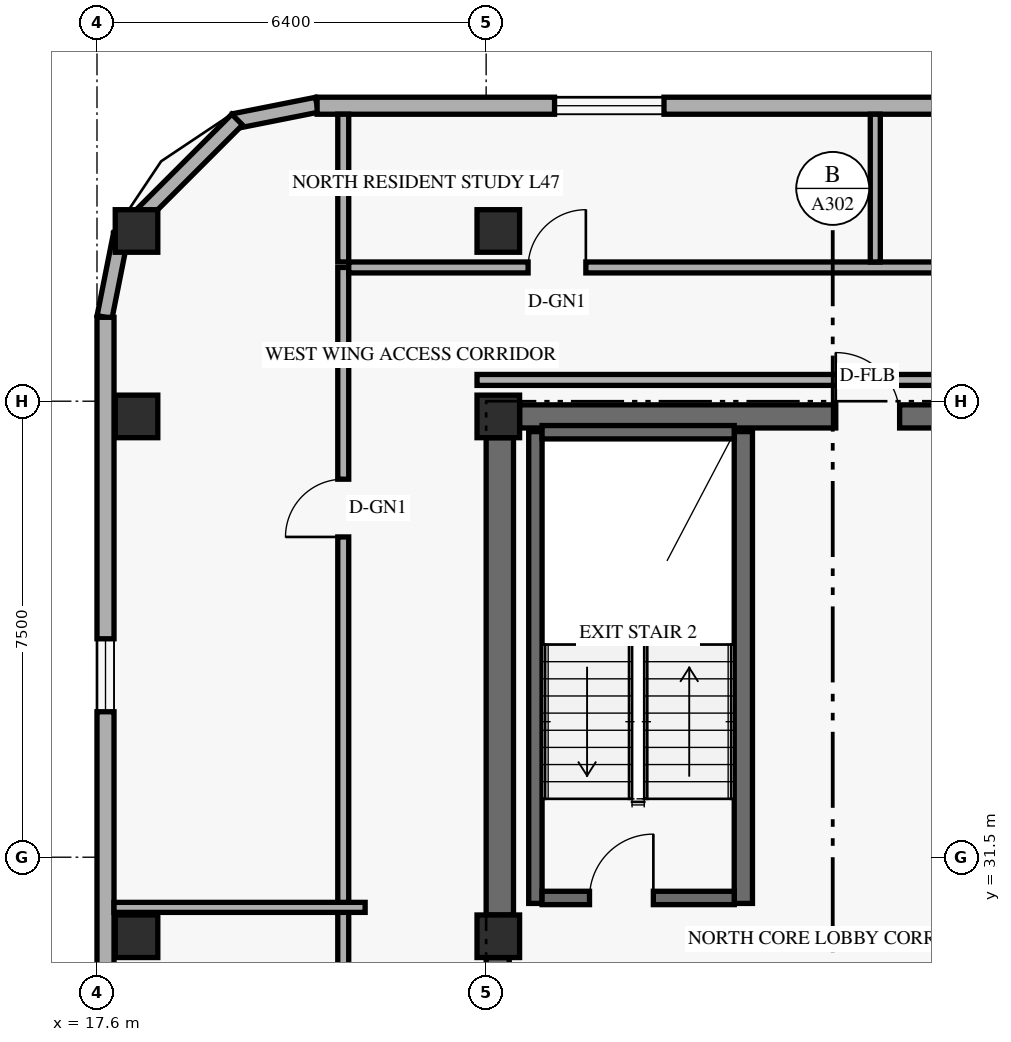
"""IFC4 building model, lengths in metres.
Left out: names, types, materials, properties, quantities, classifications, styles, units other than length and angle.
Written with IfcOpenShell. Run it as: python <this file> out.ifc"""

import sys

from ifc_helpers import new_model, si_unit, direction, frame, frame_2d, origin, origin_2d, place, context, subcontext, project, spatial, rectangle, extrude, element, fill, save


model = new_model("IFC4")
c1 = context("Model", 3, precision=1e-05, world=origin(), true_north=direction((0.0, 1.0)))
c2 = subcontext(c1, "Body", "Model", "MODEL_VIEW")
j1 = project(units=[si_unit("LENGTHUNIT", "METRE"), si_unit("PLANEANGLEUNIT", "RADIAN")], contexts=[c1])
p1 = place(None, origin())
s1 = spatial("IfcSite", under=j1, at=p1, CompositionType="ELEMENT")
p2 = place(p1, origin())
s2 = spatial("IfcBuilding", under=s1, at=p2, CompositionType="ELEMENT")
p3 = place(p2, frame((0.0, 0.0, 181.2)))
s3 = spatial("IfcBuildingStorey", under=s2, at=p3, CompositionType="ELEMENT", Elevation=181.2)
p4 = place(p3, frame((24.19, 17.9, 0.0), z_axis=(0.0, 0.0, 1.0), x_axis=(0.0, 1.0, 0.0)))
e1 = element("IfcWall", 1, at=p4, inside=s3, PredefinedType="SHEAR", context=c2, shape_type="SweptSolid", body=[
    extrude(rectangle(XDim=11.95, YDim=0.38, at=frame_2d((5.975, 0.0))), origin(), (0.0, 0.0, 1.0), 2.748),
])
p5 = place(p3, frame((24.225, 30.55, 0.0), z_axis=(0.0, 0.0, 1.0), x_axis=(0.0, 1.0, 0.0)))
e2 = element("IfcWall", 2, at=p5, inside=s3, PredefinedType="SHEAR", context=c2, shape_type="SweptSolid", body=[
    extrude(rectangle(XDim=7.85, YDim=0.45, at=frame_2d((3.925, 0.0))), origin(), (0.0, 0.0, 1.0), 2.748),
])
p6 = place(p3, frame((24.55, 38.75, 0.0), z_axis=(0.0, 0.0, 1.0), x_axis=(1.0, 0.0, 0.0)))
e3 = element("IfcWall", 3, at=p6, inside=s3, PredefinedType="SHEAR", context=c2, shape_type="SweptSolid", body=[
    extrude(rectangle(XDim=10.3, YDim=0.38, at=frame_2d((5.15, 0.0))), origin(), (0.0, 0.0, 1.0), 3.36),
])
p7 = place(p6, frame((5.2, 0.0, 0.0)))
e4 = element("IfcOpeningElement", 4, at=p7, cuts=e3, PredefinedType="OPENING", context=c2, shape_type="SweptSolid", body=[
    extrude(rectangle(XDim=1.05, YDim=2.15, at=frame_2d((0.525, 1.075))), frame((0.0, 0.2, 0.0), z_axis=(0.0, -1.0, 0.0), x_axis=(1.0, 0.0, 0.0)), (0.0, 0.0, 1.0), 0.4),
])
p8 = place(p3, frame((24.81, 30.74, 0.0), z_axis=(0.0, 0.0, 1.0), x_axis=(0.0, 1.0, 0.0)))
e5 = element("IfcWall", 5, at=p8, inside=s3, PredefinedType="SHEAR", context=c2, shape_type="SweptSolid", body=[
    extrude(rectangle(XDim=7.76, YDim=0.22, at=frame_2d((3.88, 0.0))), origin(), (0.0, 0.0, 1.0), 3.36),
])
p9 = place(p3, frame((28.23, 30.74, 0.0), z_axis=(0.0, 0.0, 1.0), x_axis=(0.0, 1.0, 0.0)))
e6 = element("IfcWall", 6, at=p9, inside=s3, PredefinedType="SHEAR", context=c2, shape_type="SweptSolid", body=[
    extrude(rectangle(XDim=7.76, YDim=0.3, at=frame_2d((3.88, 0.0))), origin(), (0.0, 0.0, 1.0), 3.36),
])
p10 = place(p3, frame((24.92, 30.83, 0.0), z_axis=(0.0, 0.0, 1.0), x_axis=(1.0, 0.0, 0.0)))
e7 = element("IfcWall", 7, at=p10, inside=s3, PredefinedType="SHEAR", context=c2, shape_type="SweptSolid", body=[
    extrude(rectangle(XDim=3.16, YDim=0.22, at=frame_2d((1.58, 0.0))), origin(), (0.0, 0.0, 1.0), 3.36),
])
p11 = place(p10, frame((0.78, 0.0, 0.0)))
e8 = element("IfcOpeningElement", 8, at=p11, cuts=e7, PredefinedType="OPENING", context=c2, shape_type="SweptSolid", body=[
    extrude(rectangle(XDim=1.05, YDim=2.15, at=frame_2d((0.525, 1.075))), frame((0.0, 0.12, 0.0), z_axis=(0.0, -1.0, 0.0), x_axis=(1.0, 0.0, 0.0)), (0.0, 0.0, 1.0), 0.24),
])
p12 = place(p3, frame((24.92, 38.49, 0.0), z_axis=(0.0, 0.0, 1.0), x_axis=(1.0, 0.0, 0.0)))
e9 = element("IfcWall", 9, at=p12, inside=s3, PredefinedType="SHEAR", context=c2, shape_type="SweptSolid", body=[
    extrude(rectangle(XDim=3.16, YDim=0.22, at=frame_2d((1.58, 0.0))), origin(), (0.0, 0.0, 1.0), 3.36),
])
for number, where, z_axis, x_axis in (
    (10, (18.25, 30.2, 0.0), (0.0, 0.0, 1.0), (1.0, 0.0, 0.0)),
    (11, (18.25, 38.75, 0.0), (0.0, 0.0, 1.0), (1.0, 0.0, 0.0)),
    (12, (18.25, 41.8, 0.0), (0.0, 0.0, 1.0), (1.0, 0.0, 0.0)),
    (13, (24.2, 30.2, 0.0), (0.0, 0.0, 1.0), (1.0, 0.0, 0.0)),
    (14, (24.2, 38.75, 0.0), (0.0, 0.0, 1.0), (1.0, 0.0, 0.0)),
    (15, (24.2, 41.8, 0.0), (0.0, 0.0, 1.0), (1.0, 0.0, 0.0)),
):
    element("IfcColumn", number, at=place(p3, frame(where, z_axis=z_axis, x_axis=x_axis)), inside=s3, PredefinedType="COLUMN", context=c2, shape_type="SweptSolid", body=[
        extrude(rectangle(XDim=0.7, YDim=0.7, at=origin_2d()), origin(), (0.0, 0.0, 1.0), 3.6),
    ])
p13 = place(p3, frame((21.217, 43.876, 0.0), z_axis=(0.0, 0.0, 1.0), x_axis=(-0.980809899341, -0.19496651342, 0.0)))
e16 = element("IfcWall", 16, at=p13, inside=s3, PredefinedType="SOLIDWALL", context=c2, shape_type="SweptSolid", body=[
    extrude(rectangle(XDim=1.389, YDim=0.25, at=frame_2d((0.694, 0.0))), origin(), (0.0, 0.0, 1.0), 3.36),
])
p14 = place(p3, frame((19.905, 43.632, 0.0), z_axis=(0.0, 0.0, 1.0), x_axis=(-0.707106781187, -0.707106781187, 0.0)))
e17 = element("IfcWall", 17, at=p14, inside=s3, PredefinedType="SOLIDWALL", context=c2, shape_type="SweptSolid", body=[
    extrude(rectangle(XDim=2.739, YDim=0.25, at=frame_2d((1.37, 0.0))), origin(), (0.0, 0.0, 1.0), 3.36),
])
p15 = place(p3, frame((17.995, 41.746, 0.0), z_axis=(0.0, 0.0, 1.0), x_axis=(-0.195135625965, -0.9807762678, 0.0)))
e18 = element("IfcWall", 18, at=p15, inside=s3, PredefinedType="SOLIDWALL", context=c2, shape_type="SweptSolid", body=[
    extrude(rectangle(XDim=1.389, YDim=0.25, at=frame_2d((0.694, 0.0))), origin(), (0.0, 0.0, 1.0), 3.36),
])
p16 = place(p3, frame((54.98, 43.86, 0.0), z_axis=(0.0, 0.0, 1.0), x_axis=(-1.0, 0.0, 0.0)))
e19 = element("IfcWall", 19, at=p16, inside=s3, PredefinedType="SOLIDWALL", context=c2, shape_type="SweptSolid", body=[
    extrude(rectangle(XDim=33.76, YDim=0.28, at=frame_2d((16.88, 0.0))), origin(), (0.0, 0.0, 1.0), 3.36),
])
p17 = place(p16, frame((28.055, 0.0, 0.85)))
e20 = element("IfcOpeningElement", 20, at=p17, cuts=e19, PredefinedType="OPENING", context=c2, shape_type="SweptSolid", body=[
    extrude(rectangle(XDim=1.8, YDim=1.6, at=frame_2d((0.9, 0.8))), frame((0.0, 0.15, 0.0), z_axis=(0.0, -1.0, 0.0), x_axis=(1.0, 0.0, 0.0)), (0.0, 0.0, 1.0), 0.3),
])
p18 = place(p16, frame((21.17, 0.0, 0.85)))
e21 = element("IfcOpeningElement", 21, at=p18, cuts=e19, PredefinedType="OPENING", context=c2, shape_type="SweptSolid", body=[
    extrude(rectangle(XDim=1.8, YDim=1.6, at=frame_2d((0.9, 0.8))), frame((0.0, 0.15, 0.0), z_axis=(0.0, -1.0, 0.0), x_axis=(1.0, 0.0, 0.0)), (0.0, 0.0, 1.0), 0.3),
])
p19 = place(p16, frame((17.44, 0.0, 0.85)))
e22 = element("IfcOpeningElement", 22, at=p19, cuts=e19, PredefinedType="OPENING", context=c2, shape_type="SweptSolid", body=[
    extrude(rectangle(XDim=1.8, YDim=1.6, at=frame_2d((0.9, 0.8))), frame((0.0, 0.15, 0.0), z_axis=(0.0, -1.0, 0.0), x_axis=(1.0, 0.0, 0.0)), (0.0, 0.0, 1.0), 0.3),
])
p20 = place(p16, frame((13.32, 0.0, 0.85)))
e23 = element("IfcOpeningElement", 23, at=p20, cuts=e19, PredefinedType="OPENING", context=c2, shape_type="SweptSolid", body=[
    extrude(rectangle(XDim=1.8, YDim=1.6, at=frame_2d((0.9, 0.8))), frame((0.0, 0.15, 0.0), z_axis=(0.0, -1.0, 0.0), x_axis=(1.0, 0.0, 0.0)), (0.0, 0.0, 1.0), 0.3),
])
p21 = place(p16, frame((8.35, 0.0, 0.85)))
e24 = element("IfcOpeningElement", 24, at=p21, cuts=e19, PredefinedType="OPENING", context=c2, shape_type="SweptSolid", body=[
    extrude(rectangle(XDim=1.8, YDim=1.6, at=frame_2d((0.9, 0.8))), frame((0.0, 0.15, 0.0), z_axis=(0.0, -1.0, 0.0), x_axis=(1.0, 0.0, 0.0)), (0.0, 0.0, 1.0), 0.3),
])
p22 = place(p16, frame((5.68, 0.0, 0.85)))
e25 = element("IfcOpeningElement", 25, at=p22, cuts=e19, PredefinedType="OPENING", context=c2, shape_type="SweptSolid", body=[
    extrude(rectangle(XDim=1.2, YDim=1.5, at=frame_2d((0.6, 0.75))), frame((0.0, 0.15, 0.0), z_axis=(0.0, -1.0, 0.0), x_axis=(1.0, 0.0, 0.0)), (0.0, 0.0, 1.0), 0.3),
])
p23 = place(p16, frame((1.79, 0.0, 0.85)))
e26 = element("IfcOpeningElement", 26, at=p23, cuts=e19, PredefinedType="OPENING", context=c2, shape_type="SweptSolid", body=[
    extrude(rectangle(XDim=1.8, YDim=1.6, at=frame_2d((0.9, 0.8))), frame((0.0, 0.15, 0.0), z_axis=(0.0, -1.0, 0.0), x_axis=(1.0, 0.0, 0.0)), (0.0, 0.0, 1.0), 0.3),
])
p24 = place(p3, frame((17.74, 40.38, 0.0), z_axis=(0.0, 0.0, 1.0), x_axis=(0.0, -1.0, 0.0)))
e27 = element("IfcWall", 27, at=p24, inside=s3, PredefinedType="SOLIDWALL", context=c2, shape_type="SweptSolid", body=[
    extrude(rectangle(XDim=32.76, YDim=0.28, at=frame_2d((16.38, 0.0))), origin(), (0.0, 0.0, 1.0), 3.36),
])
p25 = place(p24, frame((29.073, 0.0, 0.85)))
e28 = element("IfcOpeningElement", 28, at=p25, cuts=e27, PredefinedType="OPENING", context=c2, shape_type="SweptSolid", body=[
    extrude(rectangle(XDim=1.2, YDim=1.5, at=frame_2d((0.6, 0.75))), frame((0.0, 0.15, 0.0), z_axis=(0.0, -1.0, 0.0), x_axis=(1.0, 0.0, 0.0)), (0.0, 0.0, 1.0), 0.3),
])
p26 = place(p24, frame((25.363, 0.0, 0.85)))
e29 = element("IfcOpeningElement", 29, at=p26, cuts=e27, PredefinedType="OPENING", context=c2, shape_type="SweptSolid", body=[
    extrude(rectangle(XDim=1.2, YDim=1.5, at=frame_2d((0.6, 0.75))), frame((0.0, 0.15, 0.0), z_axis=(0.0, -1.0, 0.0), x_axis=(1.0, 0.0, 0.0)), (0.0, 0.0, 1.0), 0.3),
])
p27 = place(p24, frame((15.7, 0.0, 0.85)))
e30 = element("IfcOpeningElement", 30, at=p27, cuts=e27, PredefinedType="OPENING", context=c2, shape_type="SweptSolid", body=[
    extrude(rectangle(XDim=1.2, YDim=1.5, at=frame_2d((0.6, 0.75))), frame((0.0, 0.15, 0.0), z_axis=(0.0, -1.0, 0.0), x_axis=(1.0, 0.0, 0.0)), (0.0, 0.0, 1.0), 0.3),
])
p28 = place(p24, frame((5.288, 0.0, 0.85)))
e31 = element("IfcOpeningElement", 31, at=p28, cuts=e27, PredefinedType="OPENING", context=c2, shape_type="SweptSolid", body=[
    extrude(rectangle(XDim=1.2, YDim=1.5, at=frame_2d((0.6, 0.75))), frame((0.0, 0.15, 0.0), z_axis=(0.0, -1.0, 0.0), x_axis=(1.0, 0.0, 0.0)), (0.0, 0.0, 1.0), 0.3),
])
p29 = place(p3, frame((21.65, 6.8, 0.0), z_axis=(0.0, 0.0, 1.0), x_axis=(0.0, 1.0, 0.0)))
e32 = element("IfcWall", 32, at=p29, inside=s3, PredefinedType="STANDARD", context=c2, shape_type="SweptSolid", body=[
    extrude(rectangle(XDim=34.4, YDim=0.18, at=frame_2d((17.2, 0.0))), origin(), (0.0, 0.0, 1.0), 2.73),
])
p30 = place(p29, frame((0.732, 0.0, 0.0)))
e33 = element("IfcOpeningElement", 33, at=p30, cuts=e32, PredefinedType="OPENING", context=c2, shape_type="SweptSolid", body=[
    extrude(rectangle(XDim=0.95, YDim=2.15, at=frame_2d((0.475, 1.075))), frame((0.0, 0.1, 0.0), z_axis=(0.0, -1.0, 0.0), x_axis=(1.0, 0.0, 0.0)), (0.0, 0.0, 1.0), 0.2),
])
p31 = place(p29, frame((7.768, 0.0, 0.0)))
e34 = element("IfcOpeningElement", 34, at=p31, cuts=e32, PredefinedType="OPENING", context=c2, shape_type="SweptSolid", body=[
    extrude(rectangle(XDim=0.95, YDim=2.15, at=frame_2d((0.475, 1.075))), frame((0.0, 0.1, 0.0), z_axis=(0.0, -1.0, 0.0), x_axis=(1.0, 0.0, 0.0)), (0.0, 0.0, 1.0), 0.2),
])
p32 = place(p29, frame((17.333, 0.0, 0.0)))
e35 = element("IfcOpeningElement", 35, at=p32, cuts=e32, PredefinedType="OPENING", context=c2, shape_type="SweptSolid", body=[
    extrude(rectangle(XDim=0.95, YDim=2.15, at=frame_2d((0.475, 1.075))), frame((0.0, 0.1, 0.0), z_axis=(0.0, -1.0, 0.0), x_axis=(1.0, 0.0, 0.0)), (0.0, 0.0, 1.0), 0.2),
])
p33 = place(p29, frame((29.968, 0.0, 0.0)))
e36 = element("IfcOpeningElement", 36, at=p33, cuts=e32, PredefinedType="OPENING", context=c2, shape_type="SweptSolid", body=[
    extrude(rectangle(XDim=0.95, YDim=2.15, at=frame_2d((0.475, 1.075))), frame((0.0, 0.1, 0.0), z_axis=(0.0, -1.0, 0.0), x_axis=(1.0, 0.0, 0.0)), (0.0, 0.0, 1.0), 0.2),
])
p34 = place(p3, frame((21.74, 41.2, 0.0), z_axis=(0.0, 0.0, 1.0), x_axis=(1.0, 0.0, 0.0)))
e37 = element("IfcWall", 37, at=p34, inside=s3, PredefinedType="STANDARD", context=c2, shape_type="SweptSolid", body=[
    extrude(rectangle(XDim=13.68, YDim=0.18, at=frame_2d((6.84, 0.0))), origin(), (0.0, 0.0, 1.0), 2.73),
])
p35 = place(p34, frame((2.95, 0.0, 0.0)))
e38 = element("IfcOpeningElement", 38, at=p35, cuts=e37, PredefinedType="OPENING", context=c2, shape_type="SweptSolid", body=[
    extrude(rectangle(XDim=0.95, YDim=2.15, at=frame_2d((0.475, 1.075))), frame((0.0, 0.1, 0.0), z_axis=(0.0, -1.0, 0.0), x_axis=(1.0, 0.0, 0.0)), (0.0, 0.0, 1.0), 0.2),
])
p36 = place(p34, frame((10.11, 0.0, 0.0)))
e39 = element("IfcOpeningElement", 39, at=p36, cuts=e37, PredefinedType="OPENING", context=c2, shape_type="SweptSolid", body=[
    extrude(rectangle(XDim=0.95, YDim=2.15, at=frame_2d((0.475, 1.075))), frame((0.0, 0.1, 0.0), z_axis=(0.0, -1.0, 0.0), x_axis=(1.0, 0.0, 0.0)), (0.0, 0.0, 1.0), 0.2),
])
p37 = place(p3, frame((23.85, 39.35, 0.0), z_axis=(0.0, 0.0, 1.0), x_axis=(1.0, 0.0, 0.0)))
e40 = element("IfcWall", 40, at=p37, inside=s3, PredefinedType="STANDARD", context=c2, shape_type="SweptSolid", body=[
    extrude(rectangle(XDim=11.57, YDim=0.18, at=frame_2d((5.785, 0.0))), origin(), (0.0, 0.0, 1.0), 2.73),
])
p38 = place(p3, frame((21.65, 41.29, 0.0), z_axis=(0.0, 0.0, 1.0), x_axis=(0.0, 1.0, 0.0)))
e41 = element("IfcWall", 41, at=p38, inside=s3, PredefinedType="PARTITIONING", context=c2, shape_type="SweptSolid", body=[
    extrude(rectangle(XDim=2.43, YDim=0.18, at=frame_2d((1.215, 0.0))), origin(), (0.0, 0.0, 1.0), 2.879),
])
p39 = place(p3, frame((17.88, 30.675, 0.0), z_axis=(0.0, 0.0, 1.0), x_axis=(1.0, 0.0, 0.0)))
e42 = element("IfcWall", 42, at=p39, inside=s3, PredefinedType="PARTITIONING", context=c2, shape_type="SweptSolid", body=[
    extrude(rectangle(XDim=4.13, YDim=0.165, at=frame_2d((2.065, 0.0))), origin(), (0.0, 0.0, 1.0), 2.879),
])
p40 = place(p3, frame((30.4, 41.29, 0.0), z_axis=(0.0, 0.0, 1.0), x_axis=(0.0, 1.0, 0.0)))
e43 = element("IfcWall", 43, at=p40, inside=s3, PredefinedType="PARTITIONING", context=c2, shape_type="SweptSolid", body=[
    extrude(rectangle(XDim=2.43, YDim=0.165, at=frame_2d((1.215, 0.0))), origin(), (0.0, 0.0, 1.0), 2.879),
])
p41 = place(p17, origin())
e44 = element("IfcWindow", 44, at=p41, inside=s3, PartitioningType="SINGLE_PANEL", PredefinedType="WINDOW", context=c2, shape_type="SweptSolid", body=[
    extrude(rectangle(XDim=1.8, YDim=1.6, at=frame_2d((0.9, 0.8))), frame((0.0, 0.03, 0.0), z_axis=(0.0, -1.0, 0.0), x_axis=(1.0, 0.0, 0.0)), (0.0, 0.0, 1.0), 0.06),
])
fill(e20, e44)
p42 = place(p28, origin())
e45 = element("IfcWindow", 45, at=p42, inside=s3, PartitioningType="SINGLE_PANEL", PredefinedType="WINDOW", context=c2, shape_type="SweptSolid", body=[
    extrude(rectangle(XDim=1.2, YDim=1.5, at=frame_2d((0.6, 0.75))), frame((0.0, 0.03, 0.0), z_axis=(0.0, -1.0, 0.0), x_axis=(1.0, 0.0, 0.0)), (0.0, 0.0, 1.0), 0.06),
])
fill(e31, e45)
p43 = place(p11, origin())
e46 = element("IfcDoor", 46, at=p43, inside=s3, OperationType="SINGLE_SWING_RIGHT", PredefinedType="DOOR", context=c2, shape_type="SweptSolid", body=[
    extrude(rectangle(XDim=1.05, YDim=2.15, at=frame_2d((0.525, 1.075))), frame((0.0, 0.025, 0.0), z_axis=(0.0, -1.0, 0.0), x_axis=(1.0, 0.0, 0.0)), (0.0, 0.0, 1.0), 0.05),
])
fill(e8, e46)
p44 = place(p7, frame((1.05, 0.0, 0.0), z_axis=(0.0, 0.0, 1.0), x_axis=(-1.0, 0.0, 0.0)))
e47 = element("IfcDoor", 47, at=p44, inside=s3, OperationType="SINGLE_SWING_RIGHT", PredefinedType="DOOR", context=c2, shape_type="SweptSolid", body=[
    extrude(rectangle(XDim=1.05, YDim=2.15, at=frame_2d((0.525, 1.075))), frame((0.0, 0.025, 0.0), z_axis=(0.0, -1.0, 0.0), x_axis=(1.0, 0.0, 0.0)), (0.0, 0.0, 1.0), 0.05),
])
fill(e4, e47)
p45 = place(p33, origin())
e48 = element("IfcDoor", 48, at=p45, inside=s3, OperationType="SINGLE_SWING_LEFT", PredefinedType="DOOR", context=c2, shape_type="SweptSolid", body=[
    extrude(rectangle(XDim=0.95, YDim=2.15, at=frame_2d((0.475, 1.075))), frame((0.0, 0.025, 0.0), z_axis=(0.0, -1.0, 0.0), x_axis=(1.0, 0.0, 0.0)), (0.0, 0.0, 1.0), 0.05),
])
fill(e36, e48)
p46 = place(p35, origin())
e49 = element("IfcDoor", 49, at=p46, inside=s3, OperationType="SINGLE_SWING_RIGHT", PredefinedType="DOOR", context=c2, shape_type="SweptSolid", body=[
    extrude(rectangle(XDim=0.95, YDim=2.15, at=frame_2d((0.475, 1.075))), frame((0.0, 0.025, 0.0), z_axis=(0.0, -1.0, 0.0), x_axis=(1.0, 0.0, 0.0)), (0.0, 0.0, 1.0), 0.05),
])
fill(e38, e49)
save(model, sys.argv[1])
